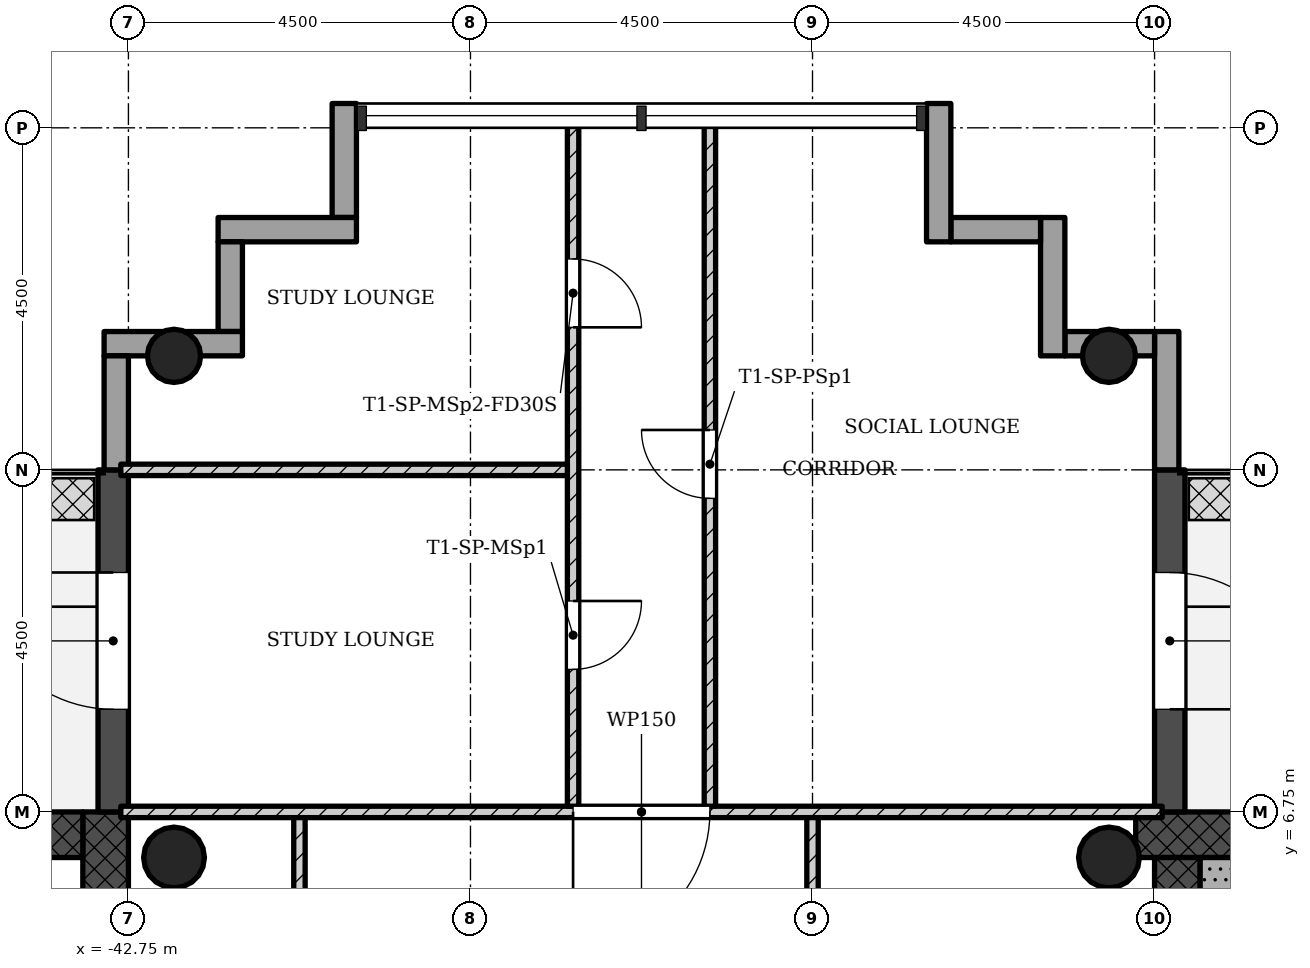
"""IFC4 building model, lengths in metres.
Left out: names, types, materials, properties, quantities, classifications, styles, units other than length and angle.
Written with IfcOpenShell. Run it as: python <this file> out.ifc"""

import sys

from ifc_helpers import new_model, si_unit, direction, frame, frame_2d, origin, origin_2d, place, context, subcontext, project, spatial, rectangle, hollow_circle, extrude, element, fill, save


model = new_model("IFC4")
c1 = context("Model", 3, precision=1e-05, world=origin(), true_north=direction((0.0, 1.0)))
c2 = subcontext(c1, "Body", "Model", "MODEL_VIEW")
j1 = project(units=[si_unit("LENGTHUNIT", "METRE"), si_unit("PLANEANGLEUNIT", "RADIAN")], contexts=[c1])
p1 = place(None, origin())
s1 = spatial("IfcSite", under=j1, at=p1, CompositionType="ELEMENT")
p2 = place(p1, origin())
s2 = spatial("IfcBuilding", under=s1, at=p2, CompositionType="ELEMENT")
p3 = place(p2, frame((0.0, 0.0, 237.9)))
s3 = spatial("IfcBuildingStorey", under=s2, at=p3, CompositionType="ELEMENT", Elevation=237.9)
p4 = place(p3, frame((-20.85, 6.45, 0.0), z_axis=(0.0, 0.0, 1.0), x_axis=(-1.0, 0.0, 0.0)))
e1 = element("IfcWall", 1, at=p4, inside=s3, PredefinedType="SHEAR", context=c2, shape_type="SweptSolid", body=[
    extrude(rectangle(XDim=8.648, YDim=0.6, at=frame_2d((4.324, 0.0))), origin(), (0.0, 0.0, 1.0), 4.5),
])
p5 = place(p3, frame((-28.95, 6.15, 0.0), z_axis=(0.0, 0.0, 1.0), x_axis=(0.0, -1.0, 0.0)))
e2 = element("IfcWall", 2, at=p5, inside=s3, PredefinedType="SHEAR", context=c2, shape_type="SweptSolid", body=[
    extrude(rectangle(XDim=12.9, YDim=0.6, at=frame_2d((6.45, 0.0))), origin(), (0.0, 0.0, 1.0), 4.5),
])
p6 = place(p5, frame((5.25, 0.0, 0.0)))
e3 = element("IfcOpeningElement", 3, at=p6, cuts=e2, PredefinedType="OPENING", context=c2, shape_type="SweptSolid", body=[
    extrude(rectangle(XDim=1.8, YDim=2.1, at=frame_2d((0.9, 1.05))), frame((0.0, 0.31, 0.0), z_axis=(0.0, -1.0, 0.0), x_axis=(1.0, 0.0, 0.0)), (0.0, 0.0, 1.0), 0.62),
])
p7 = place(p3, frame((-43.05, -6.15, 0.0), z_axis=(0.0, 0.0, 1.0), x_axis=(0.0, 1.0, 0.0)))
e4 = element("IfcWall", 4, at=p7, inside=s3, PredefinedType="SHEAR", context=c2, shape_type="SweptSolid", body=[
    extrude(rectangle(XDim=12.9, YDim=0.6, at=frame_2d((6.45, 0.0))), origin(), (0.0, 0.0, 1.0), 4.5),
])
p8 = place(p7, frame((5.25, 0.0, 0.0)))
e5 = element("IfcOpeningElement", 5, at=p8, cuts=e4, PredefinedType="OPENING", context=c2, shape_type="SweptSolid", body=[
    extrude(rectangle(XDim=1.8, YDim=2.1, at=frame_2d((0.9, 1.05))), frame((0.0, 0.31, 0.0), z_axis=(0.0, -1.0, 0.0), x_axis=(1.0, 0.0, 0.0)), (0.0, 0.0, 1.0), 0.62),
])
p9 = place(p3, frame((-43.35, 6.45, 0.0), z_axis=(0.0, 0.0, 1.0), x_axis=(-1.0, 0.0, 0.0)))
e6 = element("IfcWall", 6, at=p9, inside=s3, PredefinedType="SHEAR", context=c2, shape_type="SweptSolid", body=[
    extrude(rectangle(XDim=8.4, YDim=0.6, at=frame_2d((4.2, 0.0))), origin(), (0.0, 0.0, 1.0), 4.5),
])
for number, where, z_axis, x_axis in (
    (7, (-29.85, 12.75, 0.0), (0.0, 0.0, 1.0), (1.0, 0.0, 0.0)),
    (8, (-42.15, 12.75, 0.0), (0.0, 0.0, 1.0), (1.0, 0.0, 0.0)),
):
    element("IfcColumn", number, at=place(p3, frame(where, z_axis=z_axis, x_axis=x_axis)), inside=s3, PredefinedType="COLUMN", context=c2, shape_type="SweptSolid", body=[
        extrude(hollow_circle(Radius=0.35, WallThickness=0.025, at=origin_2d()), origin(), (0.0, 0.0, 1.0), 4.5),
    ])
for number, where, z_axis, x_axis in (
    (9, (-29.85, 6.15, 0.0), (0.0, 0.0, 1.0), (1.0, 0.0, 0.0)),
    (10, (-42.15, 6.15, 0.0), (0.0, 0.0, 1.0), (1.0, 0.0, 0.0)),
):
    element("IfcColumn", number, at=place(p3, frame(where, z_axis=z_axis, x_axis=x_axis)), inside=s3, PredefinedType="COLUMN", context=c2, shape_type="SweptSolid", body=[
        extrude(hollow_circle(Radius=0.4, WallThickness=0.028, at=origin_2d()), origin(), (0.0, 0.0, 1.0), 4.5),
    ])
p10 = place(p3, frame((-29.05, 6.75, -0.02), z_axis=(0.0, 0.0, 1.0), x_axis=(0.0, 1.0, 0.0)))
e11 = element("IfcWall", 11, at=p10, inside=s3, PredefinedType="STANDARD", context=c2, shape_type="SweptSolid", body=[
    extrude(rectangle(XDim=4.5, YDim=0.4, at=frame_2d((2.25, 0.0))), origin(), (0.0, 0.0, 1.0), 4.22),
])
p11 = place(p10, frame((1.35, 0.0, 0.02)))
e12 = element("IfcOpeningElement", 12, at=p11, cuts=e11, PredefinedType="OPENING", context=c2, shape_type="SweptSolid", body=[
    extrude(rectangle(XDim=1.8, YDim=2.1, at=frame_2d((0.9, 1.05))), frame((0.0, 0.21, 0.0), z_axis=(0.0, -1.0, 0.0), x_axis=(1.0, 0.0, 0.0)), (0.0, 0.0, 1.0), 0.42),
])
p12 = place(p3, frame((-29.09, 11.25, -0.3), z_axis=(0.0, 0.0, 1.0), x_axis=(0.0, 1.0, 0.0)))
e13 = element("IfcWall", 13, at=p12, inside=s3, PredefinedType="STANDARD", context=c2, shape_type="SweptSolid", body=[
    extrude(rectangle(XDim=1.82, YDim=0.32, at=frame_2d((0.91, 0.0))), origin(), (0.0, 0.0, 1.0), 4.5),
])
p13 = place(p3, frame((-29.25, 12.91, -0.3), z_axis=(0.0, 0.0, 1.0), x_axis=(-1.0, 0.0, 0.0)))
e14 = element("IfcWall", 14, at=p13, inside=s3, PredefinedType="STANDARD", context=c2, shape_type="SweptSolid", body=[
    extrude(rectangle(XDim=1.18, YDim=0.32, at=frame_2d((0.59, 0.0))), origin(), (0.0, 0.0, 1.0), 4.5),
])
p14 = place(p3, frame((-30.59, 12.75, -0.3), z_axis=(0.0, 0.0, 1.0), x_axis=(0.0, 1.0, 0.0)))
e15 = element("IfcWall", 15, at=p14, inside=s3, PredefinedType="STANDARD", context=c2, shape_type="SweptSolid", body=[
    extrude(rectangle(XDim=1.82, YDim=0.32, at=frame_2d((0.91, 0.0))), origin(), (0.0, 0.0, 1.0), 4.5),
])
p15 = place(p3, frame((-30.75, 14.41, -0.3), z_axis=(0.0, 0.0, 1.0), x_axis=(-1.0, 0.0, 0.0)))
e16 = element("IfcWall", 16, at=p15, inside=s3, PredefinedType="STANDARD", context=c2, shape_type="SweptSolid", body=[
    extrude(rectangle(XDim=1.18, YDim=0.32, at=frame_2d((0.59, 0.0))), origin(), (0.0, 0.0, 1.0), 4.5),
])
p16 = place(p3, frame((-32.09, 14.25, -0.3), z_axis=(0.0, 0.0, 1.0), x_axis=(0.0, 1.0, 0.0)))
e17 = element("IfcWall", 17, at=p16, inside=s3, PredefinedType="STANDARD", context=c2, shape_type="SweptSolid", body=[
    extrude(rectangle(XDim=1.82, YDim=0.32, at=frame_2d((0.91, 0.0))), origin(), (0.0, 0.0, 1.0), 4.5),
])
p17 = place(p3, frame((-39.91, 16.07, -0.3), z_axis=(0.0, 0.0, 1.0), x_axis=(0.0, -1.0, 0.0)))
e18 = element("IfcWall", 18, at=p17, inside=s3, PredefinedType="STANDARD", context=c2, shape_type="SweptSolid", body=[
    extrude(rectangle(XDim=1.5, YDim=0.32, at=frame_2d((0.75, 0.0))), origin(), (0.0, 0.0, 1.0), 4.5),
])
p18 = place(p3, frame((-39.75, 14.41, -0.3), z_axis=(0.0, 0.0, 1.0), x_axis=(-1.0, 0.0, 0.0)))
e19 = element("IfcWall", 19, at=p18, inside=s3, PredefinedType="STANDARD", context=c2, shape_type="SweptSolid", body=[
    extrude(rectangle(XDim=1.82, YDim=0.32, at=frame_2d((0.91, 0.0))), origin(), (0.0, 0.0, 1.0), 4.5),
])
p19 = place(p3, frame((-41.41, 14.25, -0.3), z_axis=(0.0, 0.0, 1.0), x_axis=(0.0, -1.0, 0.0)))
e20 = element("IfcWall", 20, at=p19, inside=s3, PredefinedType="STANDARD", context=c2, shape_type="SweptSolid", body=[
    extrude(rectangle(XDim=1.18, YDim=0.32, at=frame_2d((0.59, 0.0))), origin(), (0.0, 0.0, 1.0), 4.5),
])
p20 = place(p3, frame((-41.25, 12.91, -0.3), z_axis=(0.0, 0.0, 1.0), x_axis=(-1.0, 0.0, 0.0)))
e21 = element("IfcWall", 21, at=p20, inside=s3, PredefinedType="STANDARD", context=c2, shape_type="SweptSolid", body=[
    extrude(rectangle(XDim=1.82, YDim=0.32, at=frame_2d((0.91, 0.0))), origin(), (0.0, 0.0, 1.0), 4.5),
])
p21 = place(p3, frame((-42.91, 12.75, -0.3), z_axis=(0.0, 0.0, 1.0), x_axis=(0.0, -1.0, 0.0)))
e22 = element("IfcWall", 22, at=p21, inside=s3, PredefinedType="STANDARD", context=c2, shape_type="SweptSolid", body=[
    extrude(rectangle(XDim=1.5, YDim=0.32, at=frame_2d((0.75, 0.0))), origin(), (0.0, 0.0, 1.0), 4.5),
])
p22 = place(p3, frame((-42.95, 11.25, -0.02), z_axis=(0.0, 0.0, 1.0), x_axis=(0.0, -1.0, 0.0)))
e23 = element("IfcWall", 23, at=p22, inside=s3, PredefinedType="STANDARD", context=c2, shape_type="SweptSolid", body=[
    extrude(rectangle(XDim=4.5, YDim=0.4, at=frame_2d((2.25, 0.0))), origin(), (0.0, 0.0, 1.0), 4.22),
])
p23 = place(p22, frame((1.35, 0.0, 0.02)))
e24 = element("IfcOpeningElement", 24, at=p23, cuts=e23, PredefinedType="OPENING", context=c2, shape_type="SweptSolid", body=[
    extrude(rectangle(XDim=1.8, YDim=2.1, at=frame_2d((0.9, 1.05))), frame((0.0, 0.21, 0.0), z_axis=(0.0, -1.0, 0.0), x_axis=(1.0, 0.0, 0.0)), (0.0, 0.0, 1.0), 0.42),
])
p24 = place(p3, frame((-33.75, 2.25, 0.0), z_axis=(0.0, 0.0, 1.0), x_axis=(0.0, 1.0, 0.0)))
e25 = element("IfcWall", 25, at=p24, inside=s3, PredefinedType="PARTITIONING", context=c2, shape_type="SweptSolid", body=[
    extrude(rectangle(XDim=4.5, YDim=0.15, at=frame_2d((2.25, 0.0))), origin(), (0.0, 0.0, 1.0), 4.1),
])
p25 = place(p24, frame((1.8, 0.0, 0.0)))
e26 = element("IfcOpeningElement", 26, at=p25, cuts=e25, PredefinedType="OPENING", context=c2, shape_type="SweptSolid", body=[
    extrude(rectangle(XDim=0.9, YDim=2.1, at=frame_2d((0.45, 1.05))), frame((0.0, 0.085, 0.0), z_axis=(0.0, -1.0, 0.0), x_axis=(1.0, 0.0, 0.0)), (0.0, 0.0, 1.0), 0.17),
])
p26 = place(p3, frame((-40.5, 2.25, 0.0), z_axis=(0.0, 0.0, 1.0), x_axis=(0.0, 1.0, 0.0)))
e27 = element("IfcWall", 27, at=p26, inside=s3, PredefinedType="PARTITIONING", context=c2, shape_type="SweptSolid", body=[
    extrude(rectangle(XDim=4.5, YDim=0.15, at=frame_2d((2.25, 0.0))), origin(), (0.0, 0.0, 1.0), 4.1),
])
p27 = place(p26, frame((1.8, 0.0, 0.0)))
e28 = element("IfcOpeningElement", 28, at=p27, cuts=e27, PredefinedType="OPENING", context=c2, shape_type="SweptSolid", body=[
    extrude(rectangle(XDim=0.9, YDim=2.1, at=frame_2d((0.45, 1.05))), frame((0.0, 0.085, 0.0), z_axis=(0.0, -1.0, 0.0), x_axis=(1.0, 0.0, 0.0)), (0.0, 0.0, 1.0), 0.17),
])
p28 = place(p3, frame((-42.85, 6.75, 0.0), z_axis=(0.0, 0.0, 1.0), x_axis=(1.0, 0.0, 0.0)))
e29 = element("IfcWall", 29, at=p28, inside=s3, PredefinedType="PARTITIONING", context=c2, shape_type="SweptSolid", body=[
    extrude(rectangle(XDim=13.7, YDim=0.15, at=frame_2d((6.85, 0.0))), origin(), (0.0, 0.0, 1.0), 4.1),
])
p29 = place(p28, frame((5.95, 0.0, 0.0)))
e30 = element("IfcOpeningElement", 30, at=p29, cuts=e29, PredefinedType="OPENING", context=c2, shape_type="SweptSolid", body=[
    extrude(rectangle(XDim=1.8, YDim=2.1, at=frame_2d((0.9, 1.05))), frame((0.0, 0.085, 0.0), z_axis=(0.0, -1.0, 0.0), x_axis=(1.0, 0.0, 0.0)), (0.0, 0.0, 1.0), 0.17),
])
p30 = place(p3, frame((-35.1, 6.825, 0.0), z_axis=(0.0, 0.0, 1.0), x_axis=(0.0, 1.0, 0.0)))
e31 = element("IfcWall", 31, at=p30, inside=s3, PredefinedType="PARTITIONING", context=c2, shape_type="SweptSolid", body=[
    extrude(rectangle(XDim=9.025, YDim=0.15, at=frame_2d((4.513, 0.0))), origin(), (0.0, 0.0, 1.0), 4.1),
])
p31 = place(p30, frame((4.05, 0.0, 0.0)))
e32 = element("IfcOpeningElement", 32, at=p31, cuts=e31, PredefinedType="OPENING", context=c2, shape_type="SweptSolid", body=[
    extrude(rectangle(XDim=0.9, YDim=2.1, at=frame_2d((0.45, 1.05))), frame((0.0, 0.085, 0.0), z_axis=(0.0, -1.0, 0.0), x_axis=(1.0, 0.0, 0.0)), (0.0, 0.0, 1.0), 0.17),
])
p32 = place(p3, frame((-36.9, 6.825, 0.0), z_axis=(0.0, 0.0, 1.0), x_axis=(0.0, 1.0, 0.0)))
e33 = element("IfcWall", 33, at=p32, inside=s3, PredefinedType="PARTITIONING", context=c2, shape_type="SweptSolid", body=[
    extrude(rectangle(XDim=9.025, YDim=0.15, at=frame_2d((4.513, 0.0))), origin(), (0.0, 0.0, 1.0), 4.1),
])
p33 = place(p32, frame((1.8, 0.0, 0.0)))
e34 = element("IfcOpeningElement", 34, at=p33, cuts=e33, PredefinedType="OPENING", context=c2, shape_type="SweptSolid", body=[
    extrude(rectangle(XDim=0.9, YDim=2.1, at=frame_2d((0.45, 1.05))), frame((0.0, 0.085, 0.0), z_axis=(0.0, -1.0, 0.0), x_axis=(1.0, 0.0, 0.0)), (0.0, 0.0, 1.0), 0.17),
])
p34 = place(p32, frame((6.3, 0.0, 0.0)))
e35 = element("IfcOpeningElement", 35, at=p34, cuts=e33, PredefinedType="OPENING", context=c2, shape_type="SweptSolid", body=[
    extrude(rectangle(XDim=0.9, YDim=2.1, at=frame_2d((0.45, 1.05))), frame((0.0, 0.085, 0.0), z_axis=(0.0, -1.0, 0.0), x_axis=(1.0, 0.0, 0.0)), (0.0, 0.0, 1.0), 0.17),
])
p35 = place(p3, frame((-36.975, 11.25, 0.0), z_axis=(0.0, 0.0, 1.0), x_axis=(-1.0, 0.0, 0.0)))
e36 = element("IfcWall", 36, at=p35, inside=s3, PredefinedType="PARTITIONING", context=c2, shape_type="SweptSolid", body=[
    extrude(rectangle(XDim=5.875, YDim=0.15, at=frame_2d((2.938, 0.0))), origin(), (0.0, 0.0, 1.0), 4.1),
])
p36 = place(p3, frame((-28.35, 1.85, 0.0), z_axis=(0.0, 0.0, 1.0), x_axis=(0.0, 1.0, 0.0)))
e37 = element("IfcWall", 37, at=p36, inside=s3, PredefinedType="SHEAR", context=c2, shape_type="SweptSolid", body=[
    extrude(rectangle(XDim=4.3, YDim=0.6, at=frame_2d((2.15, 0.0))), origin(), (0.0, 0.0, 1.0), 4.5),
])
p37 = place(p11, origin())
e38 = element("IfcDoor", 38, at=p37, inside=s3, OperationType="SINGLE_SWING_LEFT", PredefinedType="DOOR", context=c2, shape_type="SweptSolid", body=[
    extrude(rectangle(XDim=1.8, YDim=2.1, at=frame_2d((0.9, 1.05))), frame((0.0, 0.025, 0.0), z_axis=(0.0, -1.0, 0.0), x_axis=(1.0, 0.0, 0.0)), (0.0, 0.0, 1.0), 0.05),
])
fill(e12, e38)
p38 = place(p23, origin())
e39 = element("IfcDoor", 39, at=p38, inside=s3, OperationType="SINGLE_SWING_LEFT", PredefinedType="DOOR", context=c2, shape_type="SweptSolid", body=[
    extrude(rectangle(XDim=1.8, YDim=2.1, at=frame_2d((0.9, 1.05))), frame((0.0, 0.025, 0.0), z_axis=(0.0, -1.0, 0.0), x_axis=(1.0, 0.0, 0.0)), (0.0, 0.0, 1.0), 0.05),
])
fill(e24, e39)
p39 = place(p29, origin())
e40 = element("IfcDoor", 40, at=p39, inside=s3, OperationType="SINGLE_SWING_LEFT", PredefinedType="DOOR", context=c2, shape_type="SweptSolid", body=[
    extrude(rectangle(XDim=1.8, YDim=2.1, at=frame_2d((0.9, 1.05))), frame((0.0, 0.025, 0.0), z_axis=(0.0, -1.0, 0.0), x_axis=(1.0, 0.0, 0.0)), (0.0, 0.0, 1.0), 0.05),
])
fill(e30, e40)
p40 = place(p31, origin())
e41 = element("IfcDoor", 41, at=p40, inside=s3, OperationType="SINGLE_SWING_LEFT", PredefinedType="DOOR", context=c2, shape_type="SweptSolid", body=[
    extrude(rectangle(XDim=0.9, YDim=2.1, at=frame_2d((0.45, 1.05))), frame((0.0, 0.025, 0.0), z_axis=(0.0, -1.0, 0.0), x_axis=(1.0, 0.0, 0.0)), (0.0, 0.0, 1.0), 0.05),
])
fill(e32, e41)
p41 = place(p33, origin())
e42 = element("IfcDoor", 42, at=p41, inside=s3, OperationType="SINGLE_SWING_RIGHT", PredefinedType="DOOR", context=c2, shape_type="SweptSolid", body=[
    extrude(rectangle(XDim=0.9, YDim=2.1, at=frame_2d((0.45, 1.05))), frame((0.0, 0.025, 0.0), z_axis=(0.0, -1.0, 0.0), x_axis=(1.0, 0.0, 0.0)), (0.0, 0.0, 1.0), 0.05),
])
fill(e34, e42)
p42 = place(p34, origin())
e43 = element("IfcDoor", 43, at=p42, inside=s3, OperationType="SINGLE_SWING_LEFT", PredefinedType="DOOR", context=c2, shape_type="SweptSolid", body=[
    extrude(rectangle(XDim=0.9, YDim=2.1, at=frame_2d((0.45, 1.05))), frame((0.0, 0.025, 0.0), z_axis=(0.0, -1.0, 0.0), x_axis=(1.0, 0.0, 0.0)), (0.0, 0.0, 1.0), 0.05),
])
fill(e35, e43)
save(model, sys.argv[1])
